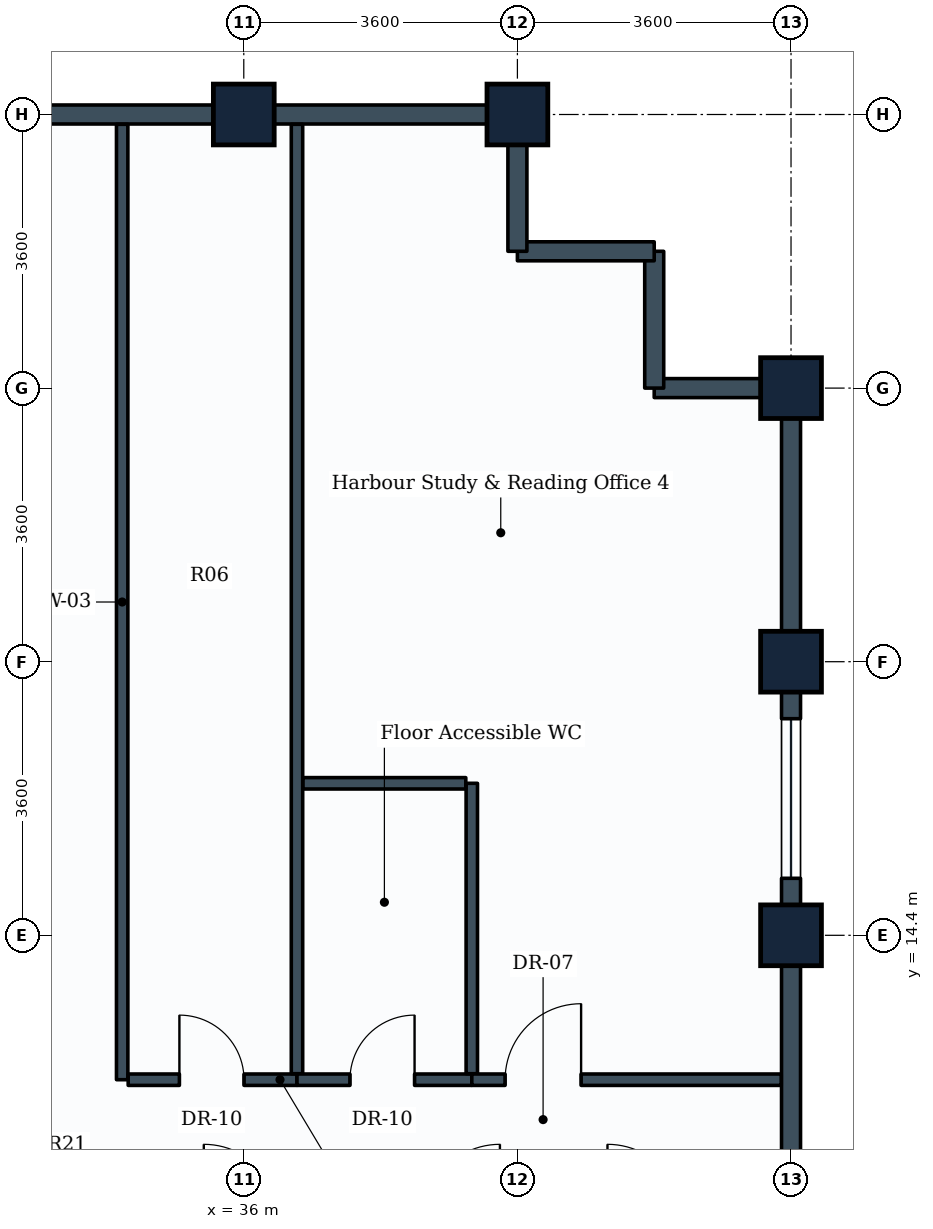
"""IFC4 building model, lengths in metres.
Left out: names, types, materials, properties, quantities, classifications, styles, units other than length and angle.
Written with IfcOpenShell. Run it as: python <this file> out.ifc"""

import sys

from ifc_helpers import new_model, si_unit, direction, frame, frame_2d, origin, origin_2d, place, context, subcontext, project, spatial, rectangle, extrude, element, fill, save


model = new_model("IFC4")
c1 = context("Model", 3, precision=1e-05, world=origin(), true_north=direction((0.0, 1.0)))
c2 = subcontext(c1, "Body", "Model", "MODEL_VIEW")
j1 = project(units=[si_unit("LENGTHUNIT", "METRE"), si_unit("PLANEANGLEUNIT", "RADIAN")], contexts=[c1])
p1 = place(None, origin())
s1 = spatial("IfcSite", under=j1, at=p1, CompositionType="ELEMENT")
p2 = place(p1, origin())
s2 = spatial("IfcBuilding", under=s1, at=p2, CompositionType="ELEMENT")
p3 = place(p2, frame((0.0, 0.0, 231.8)))
s3 = spatial("IfcBuildingStorey", under=s2, at=p3, CompositionType="ELEMENT", Elevation=231.8)
for number, where, z_axis, x_axis in (
    (1, (36.0, 25.2, 0.0), (0.0, 0.0, 1.0), (1.0, 0.0, 0.0)),
    (2, (39.6, 25.2, 0.0), (0.0, 0.0, 1.0), (1.0, 0.0, 0.0)),
    (3, (43.2, 14.4, 0.0), (0.0, 0.0, 1.0), (0.0, 1.0, 0.0)),
    (4, (43.2, 18.0, 0.0), (0.0, 0.0, 1.0), (0.0, 1.0, 0.0)),
    (5, (43.2, 21.6, 0.0), (0.0, 0.0, 1.0), (0.0, 1.0, 0.0)),
):
    element("IfcColumn", number, at=place(p3, frame(where, z_axis=z_axis, x_axis=x_axis)), inside=s3, PredefinedType="COLUMN", context=c2, shape_type="SweptSolid", body=[
        extrude(rectangle(XDim=0.8, YDim=0.8, at=origin_2d()), origin(), (0.0, 0.0, 1.0), 3.6),
    ])
p4 = place(p3, frame((43.2, 14.4, 0.0), z_axis=(0.0, 0.0, 1.0), x_axis=(0.0, -1.0, 0.0)))
e6 = element("IfcWall", 6, at=p4, inside=s3, PredefinedType="STANDARD", context=c2, shape_type="SweptSolid", body=[
    extrude(rectangle(XDim=3.6, YDim=0.25, at=frame_2d((1.8, 0.0))), origin(), (0.0, 0.0, 1.0), 2.83),
])
p5 = place(p3, frame((43.2, 18.0, 0.0), z_axis=(0.0, 0.0, 1.0), x_axis=(0.0, -1.0, 0.0)))
e7 = element("IfcWall", 7, at=p5, inside=s3, PredefinedType="STANDARD", context=c2, shape_type="SweptSolid", body=[
    extrude(rectangle(XDim=3.6, YDim=0.25, at=frame_2d((1.8, 0.0))), origin(), (0.0, 0.0, 1.0), 2.83),
])
p6 = place(p5, frame((0.75, 0.0, 0.85)))
e8 = element("IfcOpeningElement", 8, at=p6, cuts=e7, PredefinedType="OPENING", context=c2, shape_type="SweptSolid", body=[
    extrude(rectangle(XDim=2.1, YDim=1.35, at=frame_2d((1.05, 0.675))), frame((0.0, 0.135, 0.0), z_axis=(0.0, -1.0, 0.0), x_axis=(1.0, 0.0, 0.0)), (0.0, 0.0, 1.0), 0.27),
])
p7 = place(p3, frame((43.2, 21.6, 0.0), z_axis=(0.0, 0.0, 1.0), x_axis=(0.0, -1.0, 0.0)))
e9 = element("IfcWall", 9, at=p7, inside=s3, PredefinedType="STANDARD", context=c2, shape_type="SweptSolid", body=[
    extrude(rectangle(XDim=3.6, YDim=0.25, at=frame_2d((1.8, 0.0))), origin(), (0.0, 0.0, 1.0), 2.83),
])
p8 = place(p3, frame((41.4, 21.6, 0.0), z_axis=(0.0, 0.0, 1.0), x_axis=(1.0, 0.0, 0.0)))
e10 = element("IfcWall", 10, at=p8, inside=s3, PredefinedType="STANDARD", context=c2, shape_type="SweptSolid", body=[
    extrude(rectangle(XDim=1.8, YDim=0.25, at=frame_2d((0.9, 0.0))), origin(), (0.0, 0.0, 1.0), 2.83),
])
for number, where, z_axis, x_axis in (
    (11, (41.4, 23.4, 0.0), (0.0, 0.0, 1.0), (0.0, -1.0, 0.0)),
    (12, (39.6, 23.4, 0.0), (0.0, 0.0, 1.0), (1.0, 0.0, 0.0)),
):
    element("IfcWall", number, at=place(p3, frame(where, z_axis=z_axis, x_axis=x_axis)), inside=s3, PredefinedType="STANDARD", context=c2, shape_type="SweptSolid", body=[
        extrude(rectangle(XDim=1.8, YDim=0.25, at=frame_2d((0.9, 0.0))), origin(), (0.0, 0.0, 1.0), 3.335),
    ])
p9 = place(p3, frame((39.6, 25.2, 0.0), z_axis=(0.0, 0.0, 1.0), x_axis=(0.0, -1.0, 0.0)))
e13 = element("IfcWall", 13, at=p9, inside=s3, PredefinedType="STANDARD", context=c2, shape_type="SweptSolid", body=[
    extrude(rectangle(XDim=1.8, YDim=0.25, at=frame_2d((0.9, 0.0))), origin(), (0.0, 0.0, 1.0), 2.83),
])
for number, where, z_axis, x_axis in (
    (14, (36.0, 25.2, 0.0), (0.0, 0.0, 1.0), (1.0, 0.0, 0.0)),
    (15, (32.4, 25.2, 0.0), (0.0, 0.0, 1.0), (1.0, 0.0, 0.0)),
):
    element("IfcWall", number, at=place(p3, frame(where, z_axis=z_axis, x_axis=x_axis)), inside=s3, PredefinedType="STANDARD", context=c2, shape_type="SweptSolid", body=[
        extrude(rectangle(XDim=3.6, YDim=0.25, at=frame_2d((1.8, 0.0))), origin(), (0.0, 0.0, 1.0), 2.83),
    ])
p10 = place(p3, frame((34.4, 12.5, 0.0), z_axis=(0.0, 0.0, 1.0), x_axis=(0.0, 1.0, 0.0)))
e16 = element("IfcWall", 16, at=p10, inside=s3, PredefinedType="PARTITIONING", context=c2, shape_type="SweptSolid", body=[
    extrude(rectangle(XDim=12.571, YDim=0.15, at=frame_2d((6.286, 0.0))), origin(), (0.0, 0.0, 1.0), 2.83),
])
p11 = place(p3, frame((34.479, 12.5, 0.0), z_axis=(0.0, 0.0, 1.0), x_axis=(1.0, 0.0, 0.0)))
e17 = element("IfcWall", 17, at=p11, inside=s3, PredefinedType="PARTITIONING", context=c2, shape_type="SweptSolid", body=[
    extrude(rectangle(XDim=2.221, YDim=0.15, at=frame_2d((1.11, 0.0))), origin(), (0.0, 0.0, 1.0), 3.02),
])
p12 = place(p11, frame((0.674, 0.0, 0.0)))
e18 = element("IfcOpeningElement", 18, at=p12, cuts=e17, PredefinedType="OPENING", context=c2, shape_type="SweptSolid", body=[
    extrude(rectangle(XDim=0.85, YDim=2.1, at=frame_2d((0.425, 1.05))), frame((0.0, 0.085, 0.0), z_axis=(0.0, -1.0, 0.0), x_axis=(1.0, 0.0, 0.0)), (0.0, 0.0, 1.0), 0.17),
])
p13 = place(p3, frame((36.7, 12.579, 0.0), z_axis=(0.0, 0.0, 1.0), x_axis=(0.0, 1.0, 0.0)))
e19 = element("IfcWall", 19, at=p13, inside=s3, PredefinedType="PARTITIONING", context=c2, shape_type="SweptSolid", body=[
    extrude(rectangle(XDim=12.492, YDim=0.15, at=frame_2d((6.246, 0.0))), origin(), (0.0, 0.0, 1.0), 2.83),
])
p14 = place(p3, frame((36.7, 12.5, 0.0), z_axis=(0.0, 0.0, 1.0), x_axis=(1.0, 0.0, 0.0)))
e20 = element("IfcWall", 20, at=p14, inside=s3, PredefinedType="PARTITIONING", context=c2, shape_type="SweptSolid", body=[
    extrude(rectangle(XDim=2.3, YDim=0.15, at=frame_2d((1.15, 0.0))), origin(), (0.0, 0.0, 1.0), 3.335),
])
p15 = place(p14, frame((0.697, 0.0, 0.0)))
e21 = element("IfcOpeningElement", 21, at=p15, cuts=e20, PredefinedType="OPENING", context=c2, shape_type="SweptSolid", body=[
    extrude(rectangle(XDim=0.85, YDim=2.1, at=frame_2d((0.425, 1.05))), frame((0.0, 0.085, 0.0), z_axis=(0.0, -1.0, 0.0), x_axis=(1.0, 0.0, 0.0)), (0.0, 0.0, 1.0), 0.17),
])
p16 = place(p3, frame((39.0, 12.579, 0.0), z_axis=(0.0, 0.0, 1.0), x_axis=(0.0, 1.0, 0.0)))
e22 = element("IfcWall", 22, at=p16, inside=s3, PredefinedType="PARTITIONING", context=c2, shape_type="SweptSolid", body=[
    extrude(rectangle(XDim=3.821, YDim=0.15, at=frame_2d((1.91, 0.0))), origin(), (0.0, 0.0, 1.0), 3.03),
])
p17 = place(p3, frame((36.779, 16.4, 0.0), z_axis=(0.0, 0.0, 1.0), x_axis=(1.0, 0.0, 0.0)))
e23 = element("IfcWall", 23, at=p17, inside=s3, PredefinedType="PARTITIONING", context=c2, shape_type="SweptSolid", body=[
    extrude(rectangle(XDim=2.142, YDim=0.15, at=frame_2d((1.071, 0.0))), origin(), (0.0, 0.0, 1.0), 3.335),
])
p18 = place(p3, frame((39.0, 12.5, 0.0), z_axis=(0.0, 0.0, 1.0), x_axis=(1.0, 0.0, 0.0)))
e24 = element("IfcWall", 24, at=p18, inside=s3, PredefinedType="PARTITIONING", context=c2, shape_type="SweptSolid", body=[
    extrude(rectangle(XDim=4.071, YDim=0.15, at=frame_2d((2.036, 0.0))), origin(), (0.0, 0.0, 1.0), 2.83),
])
p19 = place(p18, frame((0.438, 0.0, 0.0)))
e25 = element("IfcOpeningElement", 25, at=p19, cuts=e24, PredefinedType="OPENING", context=c2, shape_type="SweptSolid", body=[
    extrude(rectangle(XDim=1.0, YDim=2.1, at=frame_2d((0.5, 1.05))), frame((0.0, 0.085, 0.0), z_axis=(0.0, -1.0, 0.0), x_axis=(1.0, 0.0, 0.0)), (0.0, 0.0, 1.0), 0.17),
])
p20 = place(p6, origin())
e26 = element("IfcWindow", 26, at=p20, inside=s3, PartitioningType="SINGLE_PANEL", PredefinedType="WINDOW", context=c2, shape_type="SweptSolid", body=[
    extrude(rectangle(XDim=2.1, YDim=1.35, at=frame_2d((1.05, 0.675))), frame((0.0, 0.03, 0.0), z_axis=(0.0, -1.0, 0.0), x_axis=(1.0, 0.0, 0.0)), (0.0, 0.0, 1.0), 0.06),
])
fill(e8, e26)
p21 = place(p12, origin())
e27 = element("IfcDoor", 27, at=p21, inside=s3, OperationType="SINGLE_SWING_LEFT", PredefinedType="DOOR", context=c2, shape_type="SweptSolid", body=[
    extrude(rectangle(XDim=0.85, YDim=2.1, at=frame_2d((0.425, 1.05))), frame((0.0, 0.025, 0.0), z_axis=(0.0, -1.0, 0.0), x_axis=(1.0, 0.0, 0.0)), (0.0, 0.0, 1.0), 0.05),
])
fill(e18, e27)
p22 = place(p15, origin())
e28 = element("IfcDoor", 28, at=p22, inside=s3, OperationType="SINGLE_SWING_RIGHT", PredefinedType="DOOR", context=c2, shape_type="SweptSolid", body=[
    extrude(rectangle(XDim=0.85, YDim=2.1, at=frame_2d((0.425, 1.05))), frame((0.0, 0.025, 0.0), z_axis=(0.0, -1.0, 0.0), x_axis=(1.0, 0.0, 0.0)), (0.0, 0.0, 1.0), 0.05),
])
fill(e21, e28)
p23 = place(p19, origin())
e29 = element("IfcDoor", 29, at=p23, inside=s3, OperationType="SINGLE_SWING_RIGHT", PredefinedType="DOOR", context=c2, shape_type="SweptSolid", body=[
    extrude(rectangle(XDim=1.0, YDim=2.1, at=frame_2d((0.5, 1.05))), frame((0.0, 0.025, 0.0), z_axis=(0.0, -1.0, 0.0), x_axis=(1.0, 0.0, 0.0)), (0.0, 0.0, 1.0), 0.05),
])
fill(e25, e29)
save(model, sys.argv[1])
